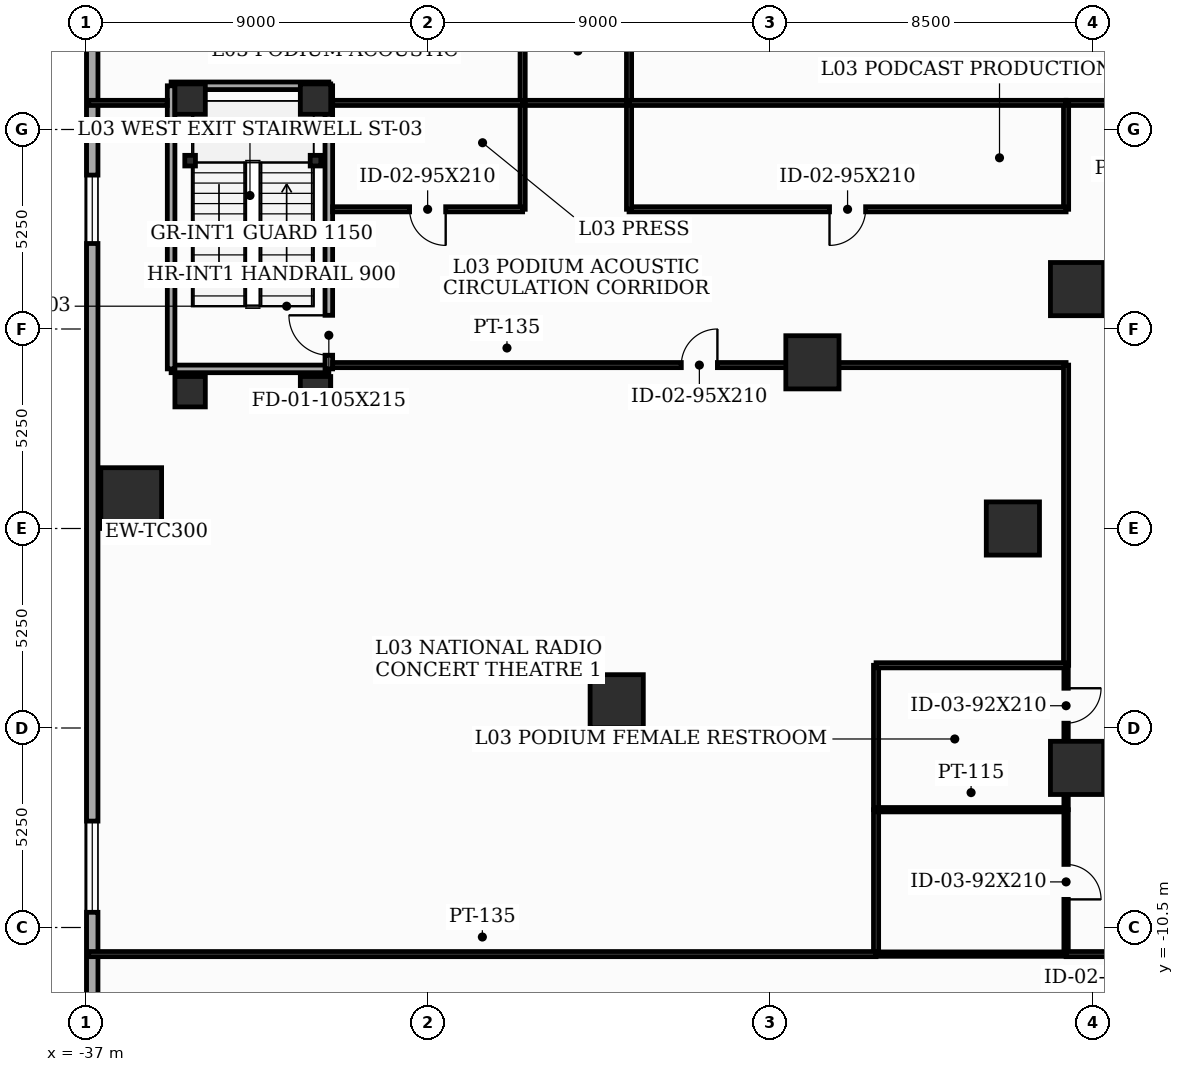
"""IFC4 building model, lengths in metres.
Left out: names, types, materials, properties, quantities, classifications, styles, units other than length and angle.
Written with IfcOpenShell. Run it as: python <this file> out.ifc"""

import sys

from ifc_helpers import new_model, si_unit, direction, frame, frame_2d, origin, origin_2d, place, context, subcontext, project, spatial, rectangle, i_section, extrude, element, fill, save


model = new_model("IFC4")
c1 = context("Model", 3, precision=1e-05, world=origin(), true_north=direction((0.0, 1.0)))
c2 = subcontext(c1, "Body", "Model", "MODEL_VIEW")
j1 = project(units=[si_unit("LENGTHUNIT", "METRE"), si_unit("PLANEANGLEUNIT", "RADIAN")], contexts=[c1])
p1 = place(None, origin())
s1 = spatial("IfcSite", under=j1, at=p1, CompositionType="ELEMENT")
p2 = place(p1, origin())
s2 = spatial("IfcBuilding", under=s1, at=p2, CompositionType="ELEMENT")
p3 = place(p2, frame((0.0, 0.0, 15.6)))
s3 = spatial("IfcBuildingStorey", under=s2, at=p3, CompositionType="ELEMENT", Elevation=15.6)
for number, where, z_axis, x_axis in (
    (1, (-10.912, 6.3, 0.0), (0.0, 0.0, 1.0), (1.0, 0.0, 0.0)),
    (2, (-12.6, 0.0, 0.0), (0.0, 0.0, 1.0), (1.0, 0.0, 0.0)),
    (3, (-10.912, -6.3, 0.0), (0.0, 0.0, 1.0), (1.0, 0.0, 0.0)),
):
    element("IfcColumn", number, at=place(p3, frame(where, z_axis=z_axis, x_axis=x_axis)), inside=s3, PredefinedType="COLUMN", context=c2, shape_type="SweptSolid", body=[
        extrude(rectangle(XDim=1.4, YDim=1.4, at=origin_2d()), origin(), (0.0, 0.0, 1.0), 5.2),
    ])
p4 = place(p3, frame((-35.8, 0.8, 0.0), z_axis=(0.0, 0.0, 1.0), x_axis=(1.0, 0.0, 0.0)))
e4 = element("IfcColumn", 4, at=p4, inside=s3, PredefinedType="COLUMN", context=c2, shape_type="SweptSolid", body=[
    extrude(rectangle(XDim=1.6, YDim=1.6, at=origin_2d()), origin(), (0.0, 0.0, 1.0), 5.2),
])
for number, where, z_axis, x_axis in (
    (5, (-17.875, 4.373, 0.0), (0.0, 0.0, 1.0), (1.0, 0.0, 0.0)),
    (6, (-23.025, -4.547, 0.0), (0.0, 0.0, 1.0), (1.0, 0.0, 0.0)),
):
    element("IfcColumn", number, at=place(p3, frame(where, z_axis=z_axis, x_axis=x_axis)), inside=s3, PredefinedType="COLUMN", context=c2, shape_type="SweptSolid", body=[
        extrude(rectangle(XDim=1.4, YDim=1.4, at=origin_2d()), origin(), (0.0, 0.0, 1.0), 5.2),
    ])
for number, where, z_axis, x_axis in (
    (7, (-34.25, 3.6, 0.0), (0.0, 0.0, 1.0), (1.0, 0.0, 0.0)),
    (8, (-30.95, 3.6, 0.0), (0.0, 0.0, 1.0), (1.0, 0.0, 0.0)),
    (9, (-30.95, 11.3, 0.0), (0.0, 0.0, 1.0), (1.0, 0.0, 0.0)),
    (10, (-34.25, 11.3, 0.0), (0.0, 0.0, 1.0), (1.0, 0.0, 0.0)),
):
    element("IfcColumn", number, at=place(p3, frame(where, z_axis=z_axis, x_axis=x_axis)), inside=s3, PredefinedType="COLUMN", context=c2, shape_type="SweptSolid", body=[
        extrude(rectangle(XDim=0.8, YDim=0.8, at=origin_2d()), origin(), (0.0, 0.0, 1.0), 5.2),
    ])
for number, where, z_axis, x_axis in (
    (11, (-34.25, 9.68, 0.0), (0.0, 0.0, 1.0), (1.0, 0.0, 0.0)),
    (12, (-30.95, 9.68, 0.0), (0.0, 0.0, 1.0), (1.0, 0.0, 0.0)),
):
    element("IfcColumn", number, at=place(p3, frame(where, z_axis=z_axis, x_axis=x_axis)), inside=s3, PredefinedType="PILASTER", context=c2, shape_type="SweptSolid", body=[
        extrude(i_section(OverallWidth=0.28, OverallDepth=0.28, WebThickness=0.01, FlangeThickness=0.018, at=origin_2d()), origin(), (0.0, 0.0, 1.0), 5.2),
    ])
p5 = place(p3, frame((-36.825, 28.5, 0.0), z_axis=(0.0, 0.0, 1.0), x_axis=(0.0, -1.0, 0.0)))
e13 = element("IfcWall", 13, at=p5, inside=s3, PredefinedType="SOLIDWALL", context=c2, shape_type="SweptSolid", body=[
    extrude(rectangle(XDim=48.0, YDim=0.3, at=frame_2d((24.0, 0.0))), origin(), (0.0, 0.0, 1.0), 4.95),
])
p6 = place(p5, frame((6.2, 0.0, 0.9)))
e14 = element("IfcOpeningElement", 14, at=p6, cuts=e13, PredefinedType="OPENING", context=c2, shape_type="SweptSolid", body=[
    extrude(rectangle(XDim=2.4, YDim=1.35, at=frame_2d((1.2, 0.675))), frame((0.0, 0.16, 0.0), z_axis=(0.0, -1.0, 0.0), x_axis=(1.0, 0.0, 0.0)), (0.0, 0.0, 1.0), 0.32),
])
p7 = place(p5, frame((19.2, 0.0, 0.9)))
e15 = element("IfcOpeningElement", 15, at=p7, cuts=e13, PredefinedType="OPENING", context=c2, shape_type="SweptSolid", body=[
    extrude(rectangle(XDim=1.8, YDim=1.35, at=frame_2d((0.9, 0.675))), frame((0.0, 0.16, 0.0), z_axis=(0.0, -1.0, 0.0), x_axis=(1.0, 0.0, 0.0)), (0.0, 0.0, 1.0), 0.32),
])
p8 = place(p5, frame((36.2, 0.0, 0.9)))
e16 = element("IfcOpeningElement", 16, at=p8, cuts=e13, PredefinedType="OPENING", context=c2, shape_type="SweptSolid", body=[
    extrude(rectangle(XDim=2.4, YDim=1.35, at=frame_2d((1.2, 0.675))), frame((0.0, 0.16, 0.0), z_axis=(0.0, -1.0, 0.0), x_axis=(1.0, 0.0, 0.0)), (0.0, 0.0, 1.0), 0.32),
])
p9 = place(p3, frame((-34.75, 4.2, 0.0), z_axis=(0.0, 0.0, 1.0), x_axis=(1.0, 0.0, 0.0)))
e17 = element("IfcWall", 17, at=p9, inside=s3, PredefinedType="SOLIDWALL", context=c2, shape_type="SweptSolid", body=[
    extrude(rectangle(XDim=4.15, YDim=0.2, at=frame_2d((2.075, 0.0))), origin(), (0.0, 0.0, 1.0), 4.95),
])
p10 = place(p3, frame((-30.6, 4.2, 0.0), z_axis=(0.0, 0.0, 1.0), x_axis=(0.0, 1.0, 0.0)))
e18 = element("IfcWall", 18, at=p10, inside=s3, PredefinedType="SOLIDWALL", context=c2, shape_type="SweptSolid", body=[
    extrude(rectangle(XDim=7.45, YDim=0.2, at=frame_2d((3.725, 0.0))), origin(), (0.0, 0.0, 1.0), 4.95),
])
p11 = place(p10, frame((0.36, 0.0, 0.0)))
e19 = element("IfcOpeningElement", 19, at=p11, cuts=e18, PredefinedType="OPENING", context=c2, shape_type="SweptSolid", body=[
    extrude(rectangle(XDim=1.05, YDim=2.15, at=frame_2d((0.525, 1.075))), frame((0.0, 0.11, 0.0), z_axis=(0.0, -1.0, 0.0), x_axis=(1.0, 0.0, 0.0)), (0.0, 0.0, 1.0), 0.22),
])
p12 = place(p3, frame((-30.6, 11.65, 0.0), z_axis=(0.0, 0.0, 1.0), x_axis=(-1.0, 0.0, 0.0)))
e20 = element("IfcWall", 20, at=p12, inside=s3, PredefinedType="SOLIDWALL", context=c2, shape_type="SweptSolid", body=[
    extrude(rectangle(XDim=4.15, YDim=0.2, at=frame_2d((2.075, 0.0))), origin(), (0.0, 0.0, 1.0), 4.95),
])
p13 = place(p3, frame((-34.75, 11.65, 0.0), z_axis=(0.0, 0.0, 1.0), x_axis=(0.0, -1.0, 0.0)))
e21 = element("IfcWall", 21, at=p13, inside=s3, PredefinedType="SOLIDWALL", context=c2, shape_type="SweptSolid", body=[
    extrude(rectangle(XDim=7.45, YDim=0.2, at=frame_2d((3.725, 0.0))), origin(), (0.0, 0.0, 1.0), 4.95),
])
p14 = place(p3, frame((-22.7, 11.2, 0.0), z_axis=(0.0, 0.0, 1.0), x_axis=(-1.0, 0.0, 0.0)))
e22 = element("IfcWall", 22, at=p14, inside=s3, PredefinedType="PARTITIONING", context=c2, shape_type="SweptSolid", body=[
    extrude(rectangle(XDim=2.8, YDim=0.135, at=frame_2d((1.4, 0.0))), origin(), (0.0, 0.0, 1.0), 4.95),
])
p15 = place(p3, frame((-30.5, 4.3, 0.0), z_axis=(0.0, 0.0, 1.0), x_axis=(1.0, 0.0, 0.0)))
e23 = element("IfcWall", 23, at=p15, inside=s3, PredefinedType="PARTITIONING", context=c2, shape_type="SweptSolid", body=[
    extrude(rectangle(XDim=19.3, YDim=0.135, at=frame_2d((9.65, 0.0))), origin(), (0.0, 0.0, 1.0), 3.435),
])
p16 = place(p15, frame((9.175, 0.0, 0.0)))
e24 = element("IfcOpeningElement", 24, at=p16, cuts=e23, PredefinedType="OPENING", context=c2, shape_type="SweptSolid", body=[
    extrude(rectangle(XDim=0.95, YDim=2.1, at=frame_2d((0.475, 1.05))), frame((0.0, 0.077, 0.0), z_axis=(0.0, -1.0, 0.0), x_axis=(1.0, 0.0, 0.0)), (0.0, 0.0, 1.0), 0.155),
])
p17 = place(p3, frame((-11.2, 4.3, 0.0), z_axis=(0.0, 0.0, 1.0), x_axis=(0.0, -1.0, 0.0)))
e25 = element("IfcWall", 25, at=p17, inside=s3, PredefinedType="PARTITIONING", context=c2, shape_type="SweptSolid", body=[
    extrude(rectangle(XDim=7.9, YDim=0.135, at=frame_2d((3.95, 0.0))), origin(), (0.0, 0.0, 1.0), 4.235),
])
p18 = place(p3, frame((-11.2, -3.6, 0.0), z_axis=(0.0, 0.0, 1.0), x_axis=(0.0, -1.0, 0.0)))
e26 = element("IfcWall", 26, at=p18, inside=s3, PredefinedType="PARTITIONING", context=c2, shape_type="SweptSolid", body=[
    extrude(rectangle(XDim=3.8, YDim=0.115, at=frame_2d((1.9, 0.0))), origin(), (0.0, 0.0, 1.0), 4.235),
])
p19 = place(p18, frame((0.604, 0.0, 0.0)))
e27 = element("IfcOpeningElement", 27, at=p19, cuts=e26, PredefinedType="OPENING", context=c2, shape_type="SweptSolid", body=[
    extrude(rectangle(XDim=0.92, YDim=2.1, at=frame_2d((0.46, 1.05))), frame((0.0, 0.067, 0.0), z_axis=(0.0, -1.0, 0.0), x_axis=(1.0, 0.0, 0.0)), (0.0, 0.0, 1.0), 0.135),
])
p20 = place(p3, frame((-11.2, -7.4, 0.0), z_axis=(0.0, 0.0, 1.0), x_axis=(0.0, -1.0, 0.0)))
e28 = element("IfcWall", 28, at=p20, inside=s3, PredefinedType="PARTITIONING", context=c2, shape_type="SweptSolid", body=[
    extrude(rectangle(XDim=3.8, YDim=0.115, at=frame_2d((1.9, 0.0))), origin(), (0.0, 0.0, 1.0), 4.95),
])
p21 = place(p20, frame((1.44, 0.0, 0.0)))
e29 = element("IfcOpeningElement", 29, at=p21, cuts=e28, PredefinedType="OPENING", context=c2, shape_type="SweptSolid", body=[
    extrude(rectangle(XDim=0.92, YDim=2.1, at=frame_2d((0.46, 1.05))), frame((0.0, 0.067, 0.0), z_axis=(0.0, -1.0, 0.0), x_axis=(1.0, 0.0, 0.0)), (0.0, 0.0, 1.0), 0.135),
])
p22 = place(p3, frame((-11.2, -11.2, 0.0), z_axis=(0.0, 0.0, 1.0), x_axis=(1.0, 0.0, 0.0)))
e30 = element("IfcWall", 30, at=p22, inside=s3, PredefinedType="PARTITIONING", context=c2, shape_type="SweptSolid", body=[
    extrude(rectangle(XDim=3.7, YDim=0.135, at=frame_2d((1.85, 0.0))), origin(), (0.0, 0.0, 1.0), 4.95),
])
p23 = place(p22, frame((1.375, 0.0, 0.0)))
e31 = element("IfcOpeningElement", 31, at=p23, cuts=e30, PredefinedType="OPENING", context=c2, shape_type="SweptSolid", body=[
    extrude(rectangle(XDim=0.95, YDim=2.1, at=frame_2d((0.475, 1.05))), frame((0.0, 0.077, 0.0), z_axis=(0.0, -1.0, 0.0), x_axis=(1.0, 0.0, 0.0)), (0.0, 0.0, 1.0), 0.155),
])
p24 = place(p3, frame((3.5, 11.2, 0.0), z_axis=(0.0, 0.0, 1.0), x_axis=(-1.0, 0.0, 0.0)))
e32 = element("IfcWall", 32, at=p24, inside=s3, PredefinedType="PARTITIONING", context=c2, shape_type="SweptSolid", body=[
    extrude(rectangle(XDim=14.7, YDim=0.135, at=frame_2d((7.35, 0.0))), origin(), (0.0, 0.0, 1.0), 3.435),
])
p25 = place(p24, frame((5.111, 0.0, 0.0)))
e33 = element("IfcOpeningElement", 33, at=p25, cuts=e32, PredefinedType="OPENING", context=c2, shape_type="SweptSolid", body=[
    extrude(rectangle(XDim=0.95, YDim=2.1, at=frame_2d((0.475, 1.05))), frame((0.0, 0.077, 0.0), z_axis=(0.0, -1.0, 0.0), x_axis=(1.0, 0.0, 0.0)), (0.0, 0.0, 1.0), 0.155),
])
p26 = place(p3, frame((-11.2, 11.2, 0.0), z_axis=(0.0, 0.0, 1.0), x_axis=(0.0, -1.0, 0.0)))
e34 = element("IfcWall", 34, at=p26, inside=s3, PredefinedType="PARTITIONING", context=c2, shape_type="SweptSolid", body=[
    extrude(rectangle(XDim=2.8, YDim=0.135, at=frame_2d((1.4, 0.0))), origin(), (0.0, 0.0, 1.0), 4.95),
])
p27 = place(p3, frame((-11.2, 8.4, 0.0), z_axis=(0.0, 0.0, 1.0), x_axis=(-1.0, 0.0, 0.0)))
e35 = element("IfcWall", 35, at=p27, inside=s3, PredefinedType="PARTITIONING", context=c2, shape_type="SweptSolid", body=[
    extrude(rectangle(XDim=11.5, YDim=0.135, at=frame_2d((5.75, 0.0))), origin(), (0.0, 0.0, 1.0), 4.235),
])
p28 = place(p27, frame((5.275, 0.0, 0.0)))
e36 = element("IfcOpeningElement", 36, at=p28, cuts=e35, PredefinedType="OPENING", context=c2, shape_type="SweptSolid", body=[
    extrude(rectangle(XDim=0.95, YDim=2.1, at=frame_2d((0.475, 1.05))), frame((0.0, 0.077, 0.0), z_axis=(0.0, -1.0, 0.0), x_axis=(1.0, 0.0, 0.0)), (0.0, 0.0, 1.0), 0.155),
])
for number, where, z_axis, x_axis in (
    (37, (-22.7, 8.4, 0.0), (0.0, 0.0, 1.0), (0.0, 1.0, 0.0)),
    (38, (-25.5, 11.2, 0.0), (0.0, 0.0, 1.0), (0.0, -1.0, 0.0)),
):
    element("IfcWall", number, at=place(p3, frame(where, z_axis=z_axis, x_axis=x_axis)), inside=s3, PredefinedType="PARTITIONING", context=c2, shape_type="SweptSolid", body=[
        extrude(rectangle(XDim=2.8, YDim=0.135, at=frame_2d((1.4, 0.0))), origin(), (0.0, 0.0, 1.0), 4.95),
    ])
p29 = place(p3, frame((-25.5, 8.4, 0.0), z_axis=(0.0, 0.0, 1.0), x_axis=(-1.0, 0.0, 0.0)))
e39 = element("IfcWall", 39, at=p29, inside=s3, PredefinedType="PARTITIONING", context=c2, shape_type="SweptSolid", body=[
    extrude(rectangle(XDim=5.0, YDim=0.135, at=frame_2d((2.5, 0.0))), origin(), (0.0, 0.0, 1.0), 4.95),
])
p30 = place(p29, frame((2.025, 0.0, 0.0)))
e40 = element("IfcOpeningElement", 40, at=p30, cuts=e39, PredefinedType="OPENING", context=c2, shape_type="SweptSolid", body=[
    extrude(rectangle(XDim=0.95, YDim=2.1, at=frame_2d((0.475, 1.05))), frame((0.0, 0.077, 0.0), z_axis=(0.0, -1.0, 0.0), x_axis=(1.0, 0.0, 0.0)), (0.0, 0.0, 1.0), 0.155),
])
p31 = place(p3, frame((-25.5, 13.8, 0.0), z_axis=(0.0, 0.0, 1.0), x_axis=(0.0, -1.0, 0.0)))
e41 = element("IfcWall", 41, at=p31, inside=s3, PredefinedType="PARTITIONING", context=c2, shape_type="SweptSolid", body=[
    extrude(rectangle(XDim=2.6, YDim=0.135, at=frame_2d((1.3, 0.0))), origin(), (0.0, 0.0, 1.0), 4.435),
])
p32 = place(p3, frame((-22.7, 11.2, 0.0), z_axis=(0.0, 0.0, 1.0), x_axis=(0.0, 1.0, 0.0)))
e42 = element("IfcWall", 42, at=p32, inside=s3, PredefinedType="PARTITIONING", context=c2, shape_type="SweptSolid", body=[
    extrude(rectangle(XDim=7.0, YDim=0.135, at=frame_2d((3.5, 0.0))), origin(), (0.0, 0.0, 1.0), 4.435),
])
p33 = place(p3, frame((-16.2, -7.4, 0.0), z_axis=(0.0, 0.0, 1.0), x_axis=(0.0, 1.0, 0.0)))
e43 = element("IfcWall", 43, at=p33, inside=s3, PredefinedType="PARTITIONING", context=c2, shape_type="SweptSolid", body=[
    extrude(rectangle(XDim=3.8, YDim=0.135, at=frame_2d((1.9, 0.0))), origin(), (0.0, 0.0, 1.0), 4.235),
])
p34 = place(p3, frame((-16.2, -3.6, 0.0), z_axis=(0.0, 0.0, 1.0), x_axis=(1.0, 0.0, 0.0)))
e44 = element("IfcWall", 44, at=p34, inside=s3, PredefinedType="PARTITIONING", context=c2, shape_type="SweptSolid", body=[
    extrude(rectangle(XDim=5.0, YDim=0.135, at=frame_2d((2.5, 0.0))), origin(), (0.0, 0.0, 1.0), 4.235),
])
p35 = place(p3, frame((-16.2, -11.2, 0.0), z_axis=(0.0, 0.0, 1.0), x_axis=(0.0, 1.0, 0.0)))
e45 = element("IfcWall", 45, at=p35, inside=s3, PredefinedType="PARTITIONING", context=c2, shape_type="SweptSolid", body=[
    extrude(rectangle(XDim=3.8, YDim=0.135, at=frame_2d((1.9, 0.0))), origin(), (0.0, 0.0, 1.0), 4.95),
])
p36 = place(p3, frame((-36.92, -11.2, 0.0), z_axis=(0.0, 0.0, 1.0), x_axis=(1.0, 0.0, 0.0)))
e46 = element("IfcWall", 46, at=p36, inside=s3, PredefinedType="PARTITIONING", context=c2, shape_type="SweptSolid", body=[
    extrude(rectangle(XDim=20.72, YDim=0.135, at=frame_2d((10.36, 0.0))), origin(), (0.0, 0.0, 1.0), 3.435),
])
p37 = place(p3, frame((-34.85, 11.2, 0.0), z_axis=(0.0, 0.0, 1.0), x_axis=(-1.0, 0.0, 0.0)))
e47 = element("IfcWall", 47, at=p37, inside=s3, PredefinedType="PARTITIONING", context=c2, shape_type="SweptSolid", body=[
    extrude(rectangle(XDim=2.07, YDim=0.135, at=frame_2d((1.035, 0.0))), origin(), (0.0, 0.0, 1.0), 4.235),
])
for number, where, z_axis, x_axis in (
    (48, (-16.2, -7.4, 0.0), (0.0, 0.0, 1.0), (1.0, 0.0, 0.0)),
    (49, (-16.2, -11.2, 0.0), (0.0, 0.0, 1.0), (1.0, 0.0, 0.0)),
):
    element("IfcWall", number, at=place(p3, frame(where, z_axis=z_axis, x_axis=x_axis)), inside=s3, PredefinedType="PARTITIONING", context=c2, shape_type="SweptSolid", body=[
        extrude(rectangle(XDim=5.0, YDim=0.115, at=frame_2d((2.5, 0.0))), origin(), (0.0, 0.0, 1.0), 4.95),
    ])
p38 = place(p3, frame((-22.7, 11.2, 0.0), z_axis=(0.0, 0.0, 1.0), x_axis=(1.0, 0.0, 0.0)))
e50 = element("IfcWall", 50, at=p38, inside=s3, PredefinedType="PARTITIONING", context=c2, shape_type="SweptSolid", body=[
    extrude(rectangle(XDim=11.5, YDim=0.135, at=frame_2d((5.75, 0.0))), origin(), (0.0, 0.0, 1.0), 4.235),
])
p39 = place(p3, frame((-30.5, 11.2, 0.0), z_axis=(0.0, 0.0, 1.0), x_axis=(1.0, 0.0, 0.0)))
e51 = element("IfcWall", 51, at=p39, inside=s3, PredefinedType="PARTITIONING", context=c2, shape_type="SweptSolid", body=[
    extrude(rectangle(XDim=5.0, YDim=0.135, at=frame_2d((2.5, 0.0))), origin(), (0.0, 0.0, 1.0), 4.95),
])
p40 = place(p7, origin())
e52 = element("IfcWindow", 52, at=p40, inside=s3, PartitioningType="SINGLE_PANEL", PredefinedType="WINDOW", context=c2, shape_type="SweptSolid", body=[
    extrude(rectangle(XDim=1.8, YDim=1.35, at=frame_2d((0.9, 0.675))), frame((0.0, 0.03, 0.0), z_axis=(0.0, -1.0, 0.0), x_axis=(1.0, 0.0, 0.0)), (0.0, 0.0, 1.0), 0.06),
])
fill(e15, e52)
p41 = place(p8, origin())
e53 = element("IfcWindow", 53, at=p41, inside=s3, PartitioningType="SINGLE_PANEL", PredefinedType="WINDOW", context=c2, shape_type="SweptSolid", body=[
    extrude(rectangle(XDim=2.4, YDim=1.35, at=frame_2d((1.2, 0.675))), frame((0.0, 0.03, 0.0), z_axis=(0.0, -1.0, 0.0), x_axis=(1.0, 0.0, 0.0)), (0.0, 0.0, 1.0), 0.06),
])
fill(e16, e53)
p42 = place(p11, origin())
e54 = element("IfcDoor", 54, at=p42, inside=s3, OperationType="SINGLE_SWING_RIGHT", PredefinedType="DOOR", context=c2, shape_type="SweptSolid", body=[
    extrude(rectangle(XDim=1.05, YDim=2.15, at=frame_2d((0.525, 1.075))), frame((0.0, 0.025, 0.0), z_axis=(0.0, -1.0, 0.0), x_axis=(1.0, 0.0, 0.0)), (0.0, 0.0, 1.0), 0.05),
])
fill(e19, e54)
p43 = place(p16, origin())
e55 = element("IfcDoor", 55, at=p43, inside=s3, OperationType="SINGLE_SWING_RIGHT", PredefinedType="DOOR", context=c2, shape_type="SweptSolid", body=[
    extrude(rectangle(XDim=0.95, YDim=2.1, at=frame_2d((0.475, 1.05))), frame((0.0, 0.025, 0.0), z_axis=(0.0, -1.0, 0.0), x_axis=(1.0, 0.0, 0.0)), (0.0, 0.0, 1.0), 0.05),
])
fill(e24, e55)
p44 = place(p19, origin())
e56 = element("IfcDoor", 56, at=p44, inside=s3, OperationType="SINGLE_SWING_LEFT", PredefinedType="DOOR", context=c2, shape_type="SweptSolid", body=[
    extrude(rectangle(XDim=0.92, YDim=2.1, at=frame_2d((0.46, 1.05))), frame((0.0, 0.025, 0.0), z_axis=(0.0, -1.0, 0.0), x_axis=(1.0, 0.0, 0.0)), (0.0, 0.0, 1.0), 0.05),
])
fill(e27, e56)
p45 = place(p21, origin())
e57 = element("IfcDoor", 57, at=p45, inside=s3, OperationType="SINGLE_SWING_RIGHT", PredefinedType="DOOR", context=c2, shape_type="SweptSolid", body=[
    extrude(rectangle(XDim=0.92, YDim=2.1, at=frame_2d((0.46, 1.05))), frame((0.0, 0.025, 0.0), z_axis=(0.0, -1.0, 0.0), x_axis=(1.0, 0.0, 0.0)), (0.0, 0.0, 1.0), 0.05),
])
fill(e29, e57)
p46 = place(p28, origin())
e58 = element("IfcDoor", 58, at=p46, inside=s3, OperationType="SINGLE_SWING_RIGHT", PredefinedType="DOOR", context=c2, shape_type="SweptSolid", body=[
    extrude(rectangle(XDim=0.95, YDim=2.1, at=frame_2d((0.475, 1.05))), frame((0.0, 0.025, 0.0), z_axis=(0.0, -1.0, 0.0), x_axis=(1.0, 0.0, 0.0)), (0.0, 0.0, 1.0), 0.05),
])
fill(e36, e58)
p47 = place(p30, origin())
e59 = element("IfcDoor", 59, at=p47, inside=s3, OperationType="SINGLE_SWING_LEFT", PredefinedType="DOOR", context=c2, shape_type="SweptSolid", body=[
    extrude(rectangle(XDim=0.95, YDim=2.1, at=frame_2d((0.475, 1.05))), frame((0.0, 0.025, 0.0), z_axis=(0.0, -1.0, 0.0), x_axis=(1.0, 0.0, 0.0)), (0.0, 0.0, 1.0), 0.05),
])
fill(e40, e59)
save(model, sys.argv[1])
